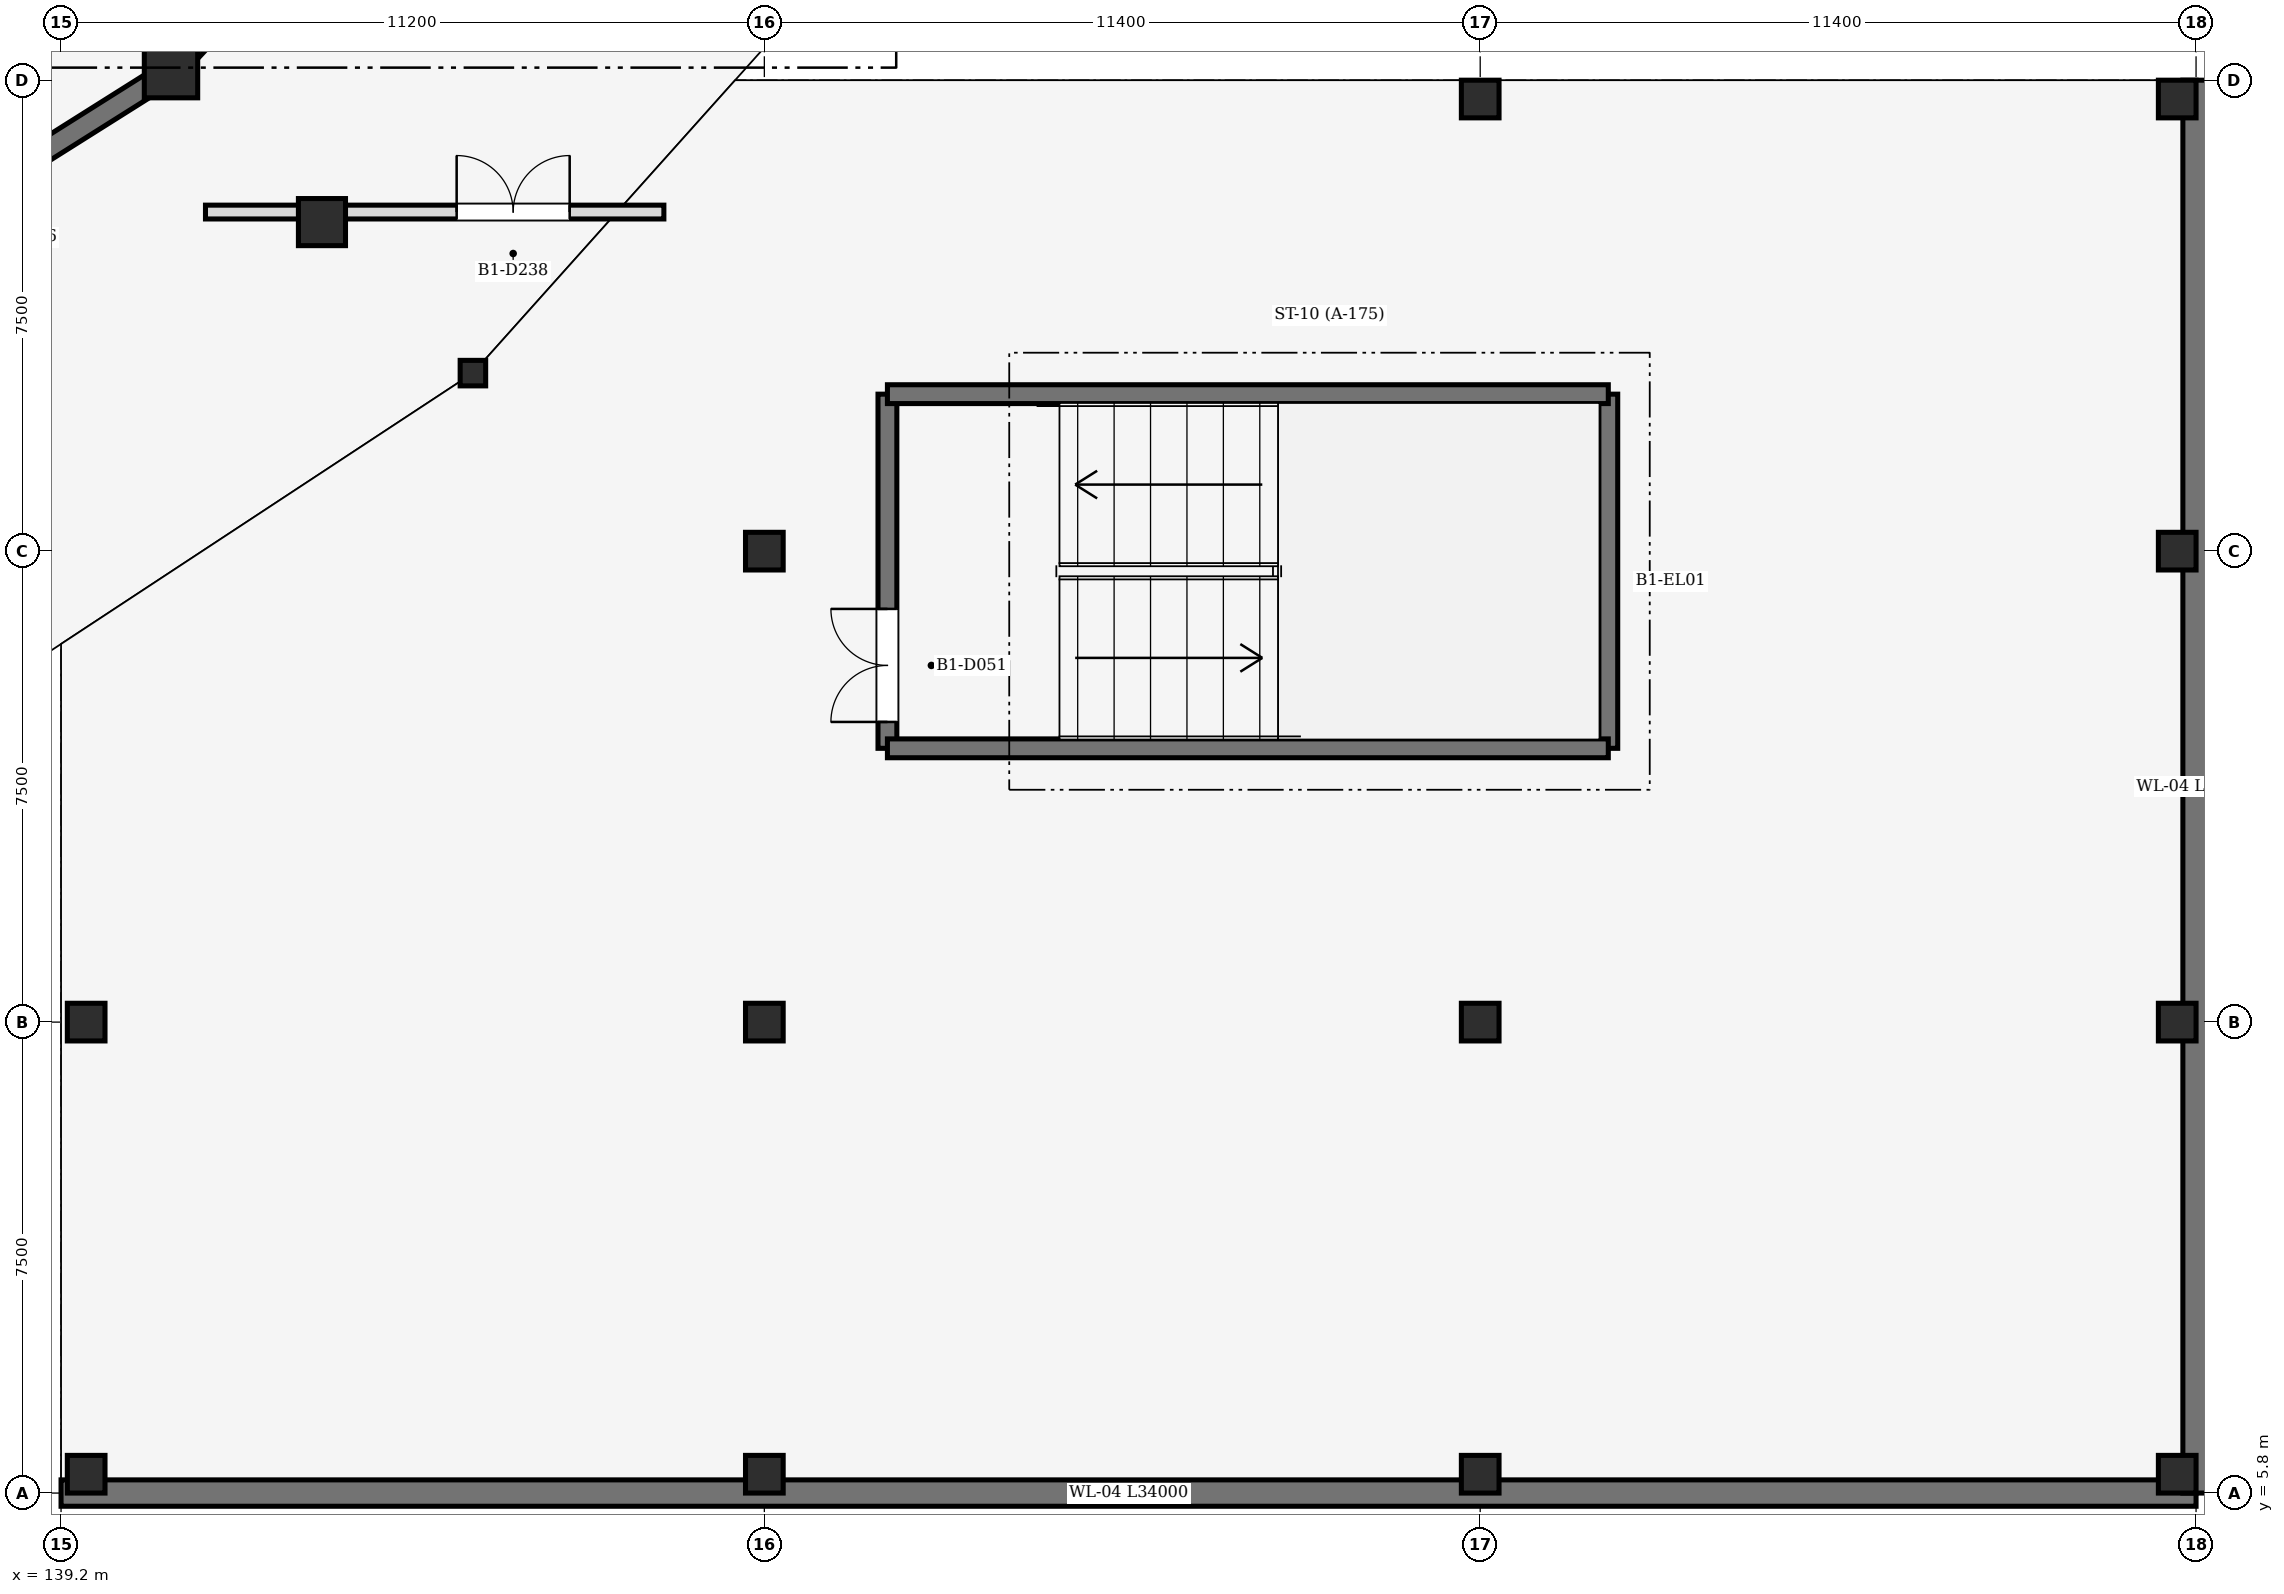
"""IFC4 building model, lengths in metres.
Left out: names, types, materials, properties, quantities, classifications, styles, units other than length and angle.
Written with IfcOpenShell. Run it as: python <this file> out.ifc"""

import sys

from ifc_helpers import new_model, si_unit, direction, frame, frame_2d, origin, origin_2d, place, context, subcontext, project, spatial, rectangle, circle, hollow_circle, extrude, element, fill, save


model = new_model("IFC4")
c1 = context("Model", 3, precision=1e-05, world=origin(), true_north=direction((0.0, 1.0)))
c2 = subcontext(c1, "Body", "Model", "MODEL_VIEW")
j1 = project(units=[si_unit("LENGTHUNIT", "METRE"), si_unit("PLANEANGLEUNIT", "RADIAN")], contexts=[c1])
p1 = place(None, origin())
s1 = spatial("IfcSite", under=j1, at=p1, CompositionType="ELEMENT")
p2 = place(p1, origin())
s2 = spatial("IfcBuilding", under=s1, at=p2, CompositionType="ELEMENT")
p3 = place(p2, frame((0.0, 0.0, -4.8)))
s3 = spatial("IfcBuildingStorey", under=s2, at=p3, CompositionType="ELEMENT", Elevation=-4.8)
p4 = place(p3, frame((140.951, 28.444, 0.0), z_axis=(0.0, 0.0, 1.0), x_axis=(1.0, 0.0, 0.0)))
e1 = element("IfcColumn", 1, at=p4, inside=s3, PredefinedType="COLUMN", context=c2, shape_type="SweptSolid", body=[
    extrude(circle(Radius=0.425, at=origin_2d()), origin(), (0.0, 0.0, 1.0), 4.8),
])
p5 = place(p3, frame((143.355, 26.04, 0.0), z_axis=(0.0, 0.0, 1.0), x_axis=(1.0, 0.0, 0.0)))
e2 = element("IfcColumn", 2, at=p5, inside=s3, PredefinedType="COLUMN", context=c2, shape_type="SweptSolid", body=[
    extrude(circle(Radius=0.375, at=origin_2d()), origin(), (0.0, 0.0, 1.0), 4.8),
])
p6 = place(p3, frame((145.759, 23.635, 0.0), z_axis=(0.0, 0.0, 1.0), x_axis=(1.0, 0.0, 0.0)))
e3 = element("IfcColumn", 3, at=p6, inside=s3, PredefinedType="COLUMN", context=c2, shape_type="SweptSolid", body=[
    extrude(hollow_circle(Radius=0.203, WallThickness=0.016, at=origin_2d()), origin(), (0.0, 0.0, 1.0), 4.8),
])
for number, where, z_axis, x_axis in (
    (4, (139.6, 6.1, 0.0), (0.0, 0.0, 1.0), (1.0, 0.0, 0.0)),
    (5, (139.6, 13.3, 0.0), (0.0, 0.0, 1.0), (1.0, 0.0, 0.0)),
    (6, (150.4, 6.1, 0.0), (0.0, 0.0, 1.0), (1.0, 0.0, 0.0)),
    (7, (150.4, 13.3, 0.0), (0.0, 0.0, 1.0), (1.0, 0.0, 0.0)),
    (8, (150.4, 20.8, 0.0), (0.0, 0.0, 1.0), (1.0, 0.0, 0.0)),
    (9, (161.8, 6.1, 0.0), (0.0, 0.0, 1.0), (1.0, 0.0, 0.0)),
    (10, (161.8, 13.3, 0.0), (0.0, 0.0, 1.0), (1.0, 0.0, 0.0)),
    (11, (161.8, 28.0, 0.0), (0.0, 0.0, 1.0), (1.0, 0.0, 0.0)),
    (12, (172.9, 6.1, 0.0), (0.0, 0.0, 1.0), (1.0, 0.0, 0.0)),
    (13, (172.9, 13.3, 0.0), (0.0, 0.0, 1.0), (1.0, 0.0, 0.0)),
    (14, (172.9, 20.8, 0.0), (0.0, 0.0, 1.0), (1.0, 0.0, 0.0)),
    (15, (172.9, 28.0, 0.0), (0.0, 0.0, 1.0), (1.0, 0.0, 0.0)),
):
    element("IfcColumn", number, at=place(p3, frame(where, z_axis=z_axis, x_axis=x_axis)), inside=s3, PredefinedType="COLUMN", context=c2, shape_type="SweptSolid", body=[
        extrude(rectangle(XDim=0.6, YDim=0.6, at=origin_2d()), origin(), (0.0, 0.0, 1.0), 4.8),
    ])
p7 = place(p3, frame((135.705, 25.139, 0.0), z_axis=(0.0, 0.0, 1.0), x_axis=(0.846151846743, 0.5329418845, 0.0)))
e16 = element("IfcWall", 16, at=p7, inside=s3, PredefinedType="SHEAR", context=c2, shape_type="SweptSolid", body=[
    extrude(rectangle(XDim=5.84, YDim=0.35, at=frame_2d((2.92, 0.0))), origin(), (0.0, 0.0, 1.0), 4.48),
])
p8 = place(p7, frame((2.36, 0.0, 0.0)))
e17 = element("IfcOpeningElement", 17, at=p8, cuts=e16, PredefinedType="OPENING", context=c2, shape_type="SweptSolid", body=[
    extrude(rectangle(XDim=1.12, YDim=2.26, at=frame_2d((0.56, 1.13))), frame((0.0, 0.187, 0.0), z_axis=(0.0, -1.0, 0.0), x_axis=(1.0, 0.0, 0.0)), (0.0, 0.0, 1.0), 0.374),
])
p9 = place(p3, frame((141.196, 28.707, 0.0), z_axis=(0.0, 0.0, 1.0), x_axis=(0.682874636689, 0.730535577893, 0.0)))
e18 = element("IfcWall", 18, at=p9, inside=s3, PredefinedType="SHEAR", context=c2, shape_type="SweptSolid", body=[
    extrude(rectangle(XDim=5.517, YDim=0.35, at=frame_2d((2.758, 0.0))), origin(), (0.0, 0.0, 1.0), 4.48),
])
p10 = place(p9, frame((2.198, 0.0, 0.0)))
e19 = element("IfcOpeningElement", 19, at=p10, cuts=e18, PredefinedType="OPENING", context=c2, shape_type="SweptSolid", body=[
    extrude(rectangle(XDim=1.12, YDim=2.26, at=frame_2d((0.56, 1.13))), frame((0.0, 0.187, 0.0), z_axis=(0.0, -1.0, 0.0), x_axis=(1.0, 0.0, 0.0)), (0.0, 0.0, 1.0), 0.374),
])
p11 = place(p3, frame((139.2, 5.8, 0.0), z_axis=(0.0, 0.0, 1.0), x_axis=(1.0, 0.0, 0.0)))
e20 = element("IfcWall", 20, at=p11, inside=s3, PredefinedType="SOLIDWALL", context=c2, shape_type="SweptSolid", body=[
    extrude(rectangle(XDim=34.0, YDim=0.42, at=frame_2d((17.0, 0.0))), origin(), (0.0, 0.0, 1.0), 4.5),
])
p12 = place(p3, frame((173.2, 5.8, 0.0), z_axis=(0.0, 0.0, 1.0), x_axis=(0.0, 1.0, 0.0)))
e21 = element("IfcWall", 21, at=p12, inside=s3, PredefinedType="SOLIDWALL", context=c2, shape_type="SweptSolid", body=[
    extrude(rectangle(XDim=22.5, YDim=0.42, at=frame_2d((11.25, 0.0))), origin(), (0.0, 0.0, 1.0), 4.5),
])
p13 = place(p3, frame((152.36, 17.66, 0.0), z_axis=(0.0, 0.0, 1.0), x_axis=(0.0, 1.0, 0.0)))
e22 = element("IfcWall", 22, at=p13, inside=s3, PredefinedType="SHEAR", context=c2, shape_type="SweptSolid", body=[
    extrude(rectangle(XDim=5.64, YDim=0.3, at=frame_2d((2.82, 0.0))), origin(), (0.0, 0.0, 1.0), 4.5),
])
p14 = place(p13, frame((0.42, 0.0, 0.0)))
e23 = element("IfcOpeningElement", 23, at=p14, cuts=e22, PredefinedType="OPENING", context=c2, shape_type="SweptSolid", body=[
    extrude(rectangle(XDim=1.8, YDim=2.2, at=frame_2d((0.9, 1.1))), frame((0.0, 0.162, 0.0), z_axis=(0.0, -1.0, 0.0), x_axis=(1.0, 0.0, 0.0)), (0.0, 0.0, 1.0), 0.324),
])
p15 = place(p3, frame((163.84, 23.3, 0.0), z_axis=(0.0, 0.0, 1.0), x_axis=(0.0, -1.0, 0.0)))
e24 = element("IfcWall", 24, at=p15, inside=s3, PredefinedType="SHEAR", context=c2, shape_type="SweptSolid", body=[
    extrude(rectangle(XDim=5.64, YDim=0.3, at=frame_2d((2.82, 0.0))), origin(), (0.0, 0.0, 1.0), 4.5),
])
for number, where, z_axis, x_axis in (
    (25, (163.84, 17.66, 0.0), (0.0, 0.0, 1.0), (-1.0, 0.0, 0.0)),
    (26, (152.36, 23.3, 0.0), (0.0, 0.0, 1.0), (1.0, 0.0, 0.0)),
):
    element("IfcWall", number, at=place(p3, frame(where, z_axis=z_axis, x_axis=x_axis)), inside=s3, PredefinedType="SHEAR", context=c2, shape_type="SweptSolid", body=[
        extrude(rectangle(XDim=11.48, YDim=0.3, at=frame_2d((5.74, 0.0))), origin(), (0.0, 0.0, 1.0), 4.5),
    ])
p16 = place(p3, frame((141.5, 26.2, 0.0), z_axis=(0.0, 0.0, 1.0), x_axis=(1.0, 0.0, 0.0)))
e27 = element("IfcWall", 27, at=p16, inside=s3, PredefinedType="SOLIDWALL", context=c2, shape_type="SweptSolid", body=[
    extrude(rectangle(XDim=7.3, YDim=0.22, at=frame_2d((3.65, 0.0))), origin(), (0.0, 0.0, 1.0), 3.86),
])
p17 = place(p16, frame((4.0, 0.0, 0.0)))
e28 = element("IfcOpeningElement", 28, at=p17, cuts=e27, PredefinedType="OPENING", context=c2, shape_type="SweptSolid", body=[
    extrude(rectangle(XDim=1.8, YDim=2.2, at=frame_2d((0.9, 1.1))), frame((0.0, 0.122, 0.0), z_axis=(0.0, -1.0, 0.0), x_axis=(1.0, 0.0, 0.0)), (0.0, 0.0, 1.0), 0.244),
])
p18 = place(p14, origin())
e29 = element("IfcDoor", 29, at=p18, inside=s3, OperationType="DOUBLE_DOOR_SINGLE_SWING", PredefinedType="DOOR", context=c2, shape_type="SweptSolid", body=[
    extrude(rectangle(XDim=1.8, YDim=2.2, at=frame_2d((0.9, 1.1))), frame((0.0, 0.025, 0.0), z_axis=(0.0, -1.0, 0.0), x_axis=(1.0, 0.0, 0.0)), (0.0, 0.0, 1.0), 0.05),
])
fill(e23, e29)
p19 = place(p17, origin())
e30 = element("IfcDoor", 30, at=p19, inside=s3, OperationType="DOUBLE_DOOR_SINGLE_SWING", PredefinedType="DOOR", context=c2, shape_type="SweptSolid", body=[
    extrude(rectangle(XDim=1.8, YDim=2.2, at=frame_2d((0.9, 1.1))), frame((0.0, 0.025, 0.0), z_axis=(0.0, -1.0, 0.0), x_axis=(1.0, 0.0, 0.0)), (0.0, 0.0, 1.0), 0.05),
])
fill(e28, e30)
save(model, sys.argv[1])
